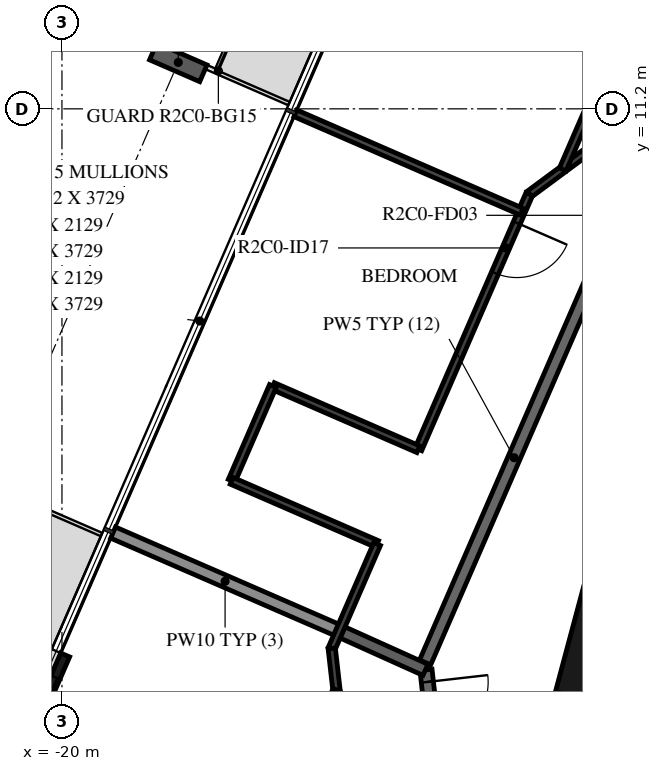
"""IFC4 building model, lengths in metres.
Left out: names, types, materials, properties, quantities, classifications, styles, units other than length and angle.
Written with IfcOpenShell. Run it as: python <this file> out.ifc"""

import sys

from ifc_helpers import new_model, si_unit, direction, frame, frame_2d, origin, origin_2d, place, context, subcontext, project, spatial, rectangle, i_section, extrude, element, fill, save


model = new_model("IFC4")
c1 = context("Model", 3, precision=1e-05, world=origin(), true_north=direction((0.0, 1.0)))
c2 = subcontext(c1, "Body", "Model", "MODEL_VIEW")
j1 = project(units=[si_unit("LENGTHUNIT", "METRE"), si_unit("PLANEANGLEUNIT", "RADIAN")], contexts=[c1])
p1 = place(None, origin())
s1 = spatial("IfcSite", under=j1, at=p1, CompositionType="ELEMENT")
p2 = place(p1, origin())
s2 = spatial("IfcBuilding", under=s1, at=p2, CompositionType="ELEMENT")
p3 = place(p2, frame((0.0, 0.0, 97.7)))
s3 = spatial("IfcBuildingStorey", under=s2, at=p3, CompositionType="ELEMENT", Elevation=97.7)
p4 = place(p3, frame((-18.087, 11.964, -0.38), z_axis=(0.0, 0.0, 1.0), x_axis=(0.398749038162, 0.917060087761, 0.0)))
e1 = element("IfcColumn", 1, at=p4, inside=s3, PredefinedType="COLUMN", context=c2, shape_type="SweptSolid", body=[
    extrude(i_section(OverallWidth=0.3, OverallDepth=0.9, WebThickness=0.019, FlangeThickness=0.035, FilletRadius=0.03, at=origin_2d()), origin(), (0.0, 0.0, 1.0), 3.5),
])
p5 = place(p3, frame((-19.947, 2.219, 0.0), z_axis=(0.0, 0.0, 1.0), x_axis=(-0.398784695066, -0.917044582876, 0.0)))
e2 = element("IfcWall", 2, at=p5, inside=s3, PredefinedType="STANDARD", context=c2, shape_type="SweptSolid", body=[
    extrude(rectangle(XDim=3.2, YDim=0.16, at=frame_2d((1.6, 0.0))), origin(), (0.0, 0.0, 1.0), 3.12),
])
p6 = place(p5, frame((0.4, 0.0, 0.0)))
e3 = element("IfcOpeningElement", 3, at=p6, cuts=e2, PredefinedType="OPENING", context=c2, shape_type="SweptSolid", body=[
    extrude(rectangle(XDim=2.4, YDim=2.4, at=frame_2d((1.2, 1.2))), frame((0.0, 0.09, 0.0), z_axis=(0.0, -1.0, 0.0), x_axis=(1.0, 0.0, 0.0)), (0.0, 0.0, 1.0), 0.18),
])
p7 = place(p3, frame((-10.858, 4.479, 0.0), z_axis=(0.0, 0.0, 1.0), x_axis=(-0.258734743916, -0.965948410781, 0.0)))
e4 = element("IfcWall", 4, at=p7, inside=s3, PredefinedType="SHEAR", context=c2, shape_type="SweptSolid", body=[
    extrude(rectangle(XDim=3.033, YDim=0.5, at=frame_2d((1.516, 0.0))), origin(), (0.0, 0.0, 1.0), 3.12),
])
p8 = place(p3, frame((-11.1, 8.829, 0.0), z_axis=(0.0, 0.0, 1.0), x_axis=(-0.398741918631, -0.917063183388, 0.0)))
e5 = element("IfcWall", 5, at=p8, inside=s3, PredefinedType="STANDARD", context=c2, shape_type="SweptSolid", body=[
    extrude(rectangle(XDim=7.342, YDim=0.2, at=frame_2d((3.671, 0.0))), origin(), (0.0, 0.0, 1.0), 3.12),
])
p9 = place(p3, frame((-14.013, 1.974, 0.0), z_axis=(0.0, 0.0, 1.0), x_axis=(0.113196526349, -0.993572617589, 0.0)))
e6 = element("IfcWall", 6, at=p9, inside=s3, PredefinedType="STANDARD", context=c2, shape_type="SweptSolid", body=[
    extrude(rectangle(XDim=7.219, YDim=0.2, at=frame_2d((3.609, 0.0))), origin(), (0.0, 0.0, 1.0), 3.12),
])
p10 = place(p9, frame((0.2, 0.0, 0.0)))
e7 = element("IfcOpeningElement", 7, at=p10, cuts=e6, PredefinedType="OPENING", context=c2, shape_type="SweptSolid", body=[
    extrude(rectangle(XDim=1.0, YDim=2.1, at=frame_2d((0.5, 1.05))), frame((0.0, 0.11, 0.0), z_axis=(0.0, -1.0, 0.0), x_axis=(1.0, 0.0, 0.0)), (0.0, 0.0, 1.0), 0.22),
])
p11 = place(p3, frame((-15.475, 2.629, 0.0), z_axis=(0.0, 0.0, 1.0), x_axis=(0.911720699372, -0.410810621011, 0.0)))
e8 = element("IfcWall", 8, at=p11, inside=s3, PredefinedType="STANDARD", context=c2, shape_type="SweptSolid", body=[
    extrude(rectangle(XDim=1.593, YDim=0.2, at=frame_2d((0.797, 0.0))), origin(), (0.0, 0.0, 1.0), 3.12),
])
p12 = place(p3, frame((-19.159, 4.231, 0.0), z_axis=(0.0, 0.0, 1.0), x_axis=(0.917067157668, -0.398732778095, 0.0)))
e9 = element("IfcWall", 9, at=p12, inside=s3, PredefinedType="STANDARD", context=c2, shape_type="SweptSolid", body=[
    extrude(rectangle(XDim=4.017, YDim=0.2, at=frame_2d((2.009, 0.0))), origin(), (0.0, 0.0, 1.0), 2.73),
])
p13 = place(p3, frame((-5.767, 14.641, 0.0), z_axis=(0.0, 0.0, 1.0), x_axis=(-0.803853364238, -0.594827511807, 0.0)))
e10 = element("IfcWall", 10, at=p13, inside=s3, PredefinedType="PARTITIONING", context=c2, shape_type="SweptSolid", body=[
    extrude(rectangle(XDim=8.146, YDim=0.12, at=frame_2d((4.073, 0.0))), origin(), (0.0, 0.0, 1.0), 3.12),
])
p14 = place(p13, frame((1.592, 0.0, 0.0)))
e11 = element("IfcOpeningElement", 11, at=p14, cuts=e10, PredefinedType="OPENING", context=c2, shape_type="SweptSolid", body=[
    extrude(rectangle(XDim=0.8, YDim=2.1, at=frame_2d((0.4, 1.05))), frame((0.0, 0.07, 0.0), z_axis=(0.0, -1.0, 0.0), x_axis=(1.0, 0.0, 0.0)), (0.0, 0.0, 1.0), 0.14),
])
p15 = place(p3, frame((-12.315, 9.796, 0.0), z_axis=(0.0, 0.0, 1.0), x_axis=(-0.398765150511, -0.917053081745, 0.0)))
e12 = element("IfcWall", 12, at=p15, inside=s3, PredefinedType="PARTITIONING", context=c2, shape_type="SweptSolid", body=[
    extrude(rectangle(XDim=4.573, YDim=0.12, at=frame_2d((2.287, 0.0))), origin(), (0.0, 0.0, 1.0), 3.12),
])
p16 = place(p15, frame((0.513, 0.0, 0.0)))
e13 = element("IfcOpeningElement", 13, at=p16, cuts=e12, PredefinedType="OPENING", context=c2, shape_type="SweptSolid", body=[
    extrude(rectangle(XDim=0.9, YDim=2.1, at=frame_2d((0.45, 1.05))), frame((0.0, 0.07, 0.0), z_axis=(0.0, -1.0, 0.0), x_axis=(1.0, 0.0, 0.0)), (0.0, 0.0, 1.0), 0.14),
])
p17 = place(p3, frame((-14.139, 5.602, 0.0), z_axis=(0.0, 0.0, 1.0), x_axis=(-0.91706559301, 0.398736376716, 0.0)))
e14 = element("IfcWall", 14, at=p17, inside=s3, PredefinedType="PARTITIONING", context=c2, shape_type="SweptSolid", body=[
    extrude(rectangle(XDim=2.609, YDim=0.12, at=frame_2d((1.304, 0.0))), origin(), (0.0, 0.0, 1.0), 3.12),
])
p18 = place(p3, frame((-16.531, 6.642, 0.0), z_axis=(0.0, 0.0, 1.0), x_axis=(-0.398783871208, -0.917044941137, 0.0)))
e15 = element("IfcWall", 15, at=p18, inside=s3, PredefinedType="PARTITIONING", context=c2, shape_type="SweptSolid", body=[
    extrude(rectangle(XDim=1.7, YDim=0.12, at=frame_2d((0.85, 0.0))), origin(), (0.0, 0.0, 1.0), 3.12),
])
p19 = place(p3, frame((-17.209, 5.083, 0.0), z_axis=(0.0, 0.0, 1.0), x_axis=(0.91706559301, -0.398736376716, 0.0)))
e16 = element("IfcWall", 16, at=p19, inside=s3, PredefinedType="PARTITIONING", context=c2, shape_type="SweptSolid", body=[
    extrude(rectangle(XDim=2.609, YDim=0.12, at=frame_2d((1.304, 0.0))), origin(), (0.0, 0.0, 1.0), 3.12),
])
p20 = place(p3, frame((-14.817, 4.043, 0.0), z_axis=(0.0, 0.0, 1.0), x_axis=(-0.398683191722, -0.917088715795, 0.0)))
e17 = element("IfcWall", 17, at=p20, inside=s3, PredefinedType="PARTITIONING", context=c2, shape_type="SweptSolid", body=[
    extrude(rectangle(XDim=1.872, YDim=0.12, at=frame_2d((0.936, 0.0))), origin(), (0.0, 0.0, 1.0), 3.12),
])
p21 = place(p3, frame((-5.952, 23.571, 0.0), z_axis=(0.0, 0.0, 1.0), x_axis=(-0.398745097158, -0.917061801348, 0.0)))
e18 = element("IfcWall", 18, at=p21, inside=s3, PredefinedType="PARTITIONING", context=c2, shape_type="SweptSolid", body=[
    extrude(rectangle(XDim=14.576, YDim=0.12, at=frame_2d((7.288, 0.0))), origin(), (0.0, 0.0, 1.0), 3.12),
])
p22 = place(p21, frame((3.878, 0.0, 0.0)))
e19 = element("IfcOpeningElement", 19, at=p22, cuts=e18, PredefinedType="OPENING", context=c2, shape_type="SweptSolid", body=[
    extrude(rectangle(XDim=0.9, YDim=2.1, at=frame_2d((0.45, 1.05))), frame((0.0, 0.07, 0.0), z_axis=(0.0, -1.0, 0.0), x_axis=(1.0, 0.0, 0.0)), (0.0, 0.0, 1.0), 0.14),
])
p23 = place(p21, frame((0.2, 0.0, 0.0)))
e20 = element("IfcOpeningElement", 20, at=p23, cuts=e18, PredefinedType="OPENING", context=c2, shape_type="SweptSolid", body=[
    extrude(rectangle(XDim=0.9, YDim=2.1, at=frame_2d((0.45, 1.05))), frame((0.0, 0.07, 0.0), z_axis=(0.0, -1.0, 0.0), x_axis=(1.0, 0.0, 0.0)), (0.0, 0.0, 1.0), 0.14),
])
p24 = place(p3, frame((-16.161, 11.126, 0.0), z_axis=(0.0, 0.0, 1.0), x_axis=(0.91705953326, -0.398750313425, 0.0)))
e21 = element("IfcWall", 21, at=p24, inside=s3, PredefinedType="PARTITIONING", context=c2, shape_type="SweptSolid", body=[
    extrude(rectangle(XDim=4.057, YDim=0.12, at=frame_2d((2.029, 0.0))), origin(), (0.0, 0.0, 1.0), 2.73),
])
p25 = place(p3, frame((-15.563, 2.326, 0.0), z_axis=(0.0, 0.0, 1.0), x_axis=(0.11320423706, -0.993571739087, 0.0)))
e22 = element("IfcWall", 22, at=p25, inside=s3, PredefinedType="PARTITIONING", context=c2, shape_type="SweptSolid", body=[
    extrude(rectangle(XDim=8.146, YDim=0.12, at=frame_2d((4.073, 0.0))), origin(), (0.0, 0.0, 1.0), 3.12),
])
p26 = place(p25, frame((2.185, 0.0, 0.0)))
e23 = element("IfcOpeningElement", 23, at=p26, cuts=e22, PredefinedType="OPENING", context=c2, shape_type="SweptSolid", body=[
    extrude(rectangle(XDim=0.8, YDim=2.1, at=frame_2d((0.4, 1.05))), frame((0.0, 0.07, 0.0), z_axis=(0.0, -1.0, 0.0), x_axis=(1.0, 0.0, 0.0)), (0.0, 0.0, 1.0), 0.14),
])
p27 = place(p3, frame((-21.298, -11.722, 0.0), z_axis=(0.0, 0.0, 1.0), x_axis=(0.398738972546, 0.91706446435, 0.0)))
e24 = element("IfcWall", 24, at=p27, inside=s3, PredefinedType="PARTITIONING", context=c2, shape_type="SweptSolid", body=[
    extrude(rectangle(XDim=14.577, YDim=0.12, at=frame_2d((7.288, 0.0))), origin(), (0.0, 0.0, 1.0), 3.12),
])
p28 = place(p27, frame((2.841, 0.0, 0.0)))
e25 = element("IfcOpeningElement", 25, at=p28, cuts=e24, PredefinedType="OPENING", context=c2, shape_type="SweptSolid", body=[
    extrude(rectangle(XDim=0.9, YDim=2.1, at=frame_2d((0.45, 1.05))), frame((0.0, 0.07, 0.0), z_axis=(0.0, -1.0, 0.0), x_axis=(1.0, 0.0, 0.0)), (0.0, 0.0, 1.0), 0.14),
])
p29 = place(p27, frame((0.605, 0.0, 0.0)))
e26 = element("IfcOpeningElement", 26, at=p29, cuts=e24, PredefinedType="OPENING", context=c2, shape_type="SweptSolid", body=[
    extrude(rectangle(XDim=0.9, YDim=2.1, at=frame_2d((0.45, 1.05))), frame((0.0, 0.07, 0.0), z_axis=(0.0, -1.0, 0.0), x_axis=(1.0, 0.0, 0.0)), (0.0, 0.0, 1.0), 0.14),
])
p30 = place(p6, origin())
e27 = element("IfcDoor", 27, at=p30, inside=s3, OperationType="DOUBLE_DOOR_SLIDING", PredefinedType="DOOR", context=c2, shape_type="SweptSolid", body=[
    extrude(rectangle(XDim=2.4, YDim=2.4, at=frame_2d((1.2, 1.2))), frame((0.0, 0.025, 0.0), z_axis=(0.0, -1.0, 0.0), x_axis=(1.0, 0.0, 0.0)), (0.0, 0.0, 1.0), 0.05),
])
fill(e3, e27)
p31 = place(p16, origin())
e28 = element("IfcDoor", 28, at=p31, inside=s3, OperationType="SINGLE_SWING_LEFT", PredefinedType="DOOR", context=c2, shape_type="SweptSolid", body=[
    extrude(rectangle(XDim=0.9, YDim=2.1, at=frame_2d((0.45, 1.05))), frame((0.0, 0.025, 0.0), z_axis=(0.0, -1.0, 0.0), x_axis=(1.0, 0.0, 0.0)), (0.0, 0.0, 1.0), 0.05),
])
fill(e13, e28)
p32 = place(p10, origin())
e29 = element("IfcDoor", 29, at=p32, inside=s3, OperationType="SINGLE_SWING_RIGHT", PredefinedType="DOOR", context=c2, shape_type="SweptSolid", body=[
    extrude(rectangle(XDim=1.0, YDim=2.1, at=frame_2d((0.5, 1.05))), frame((0.0, 0.025, 0.0), z_axis=(0.0, -1.0, 0.0), x_axis=(1.0, 0.0, 0.0)), (0.0, 0.0, 1.0), 0.05),
])
fill(e7, e29)
save(model, sys.argv[1])
